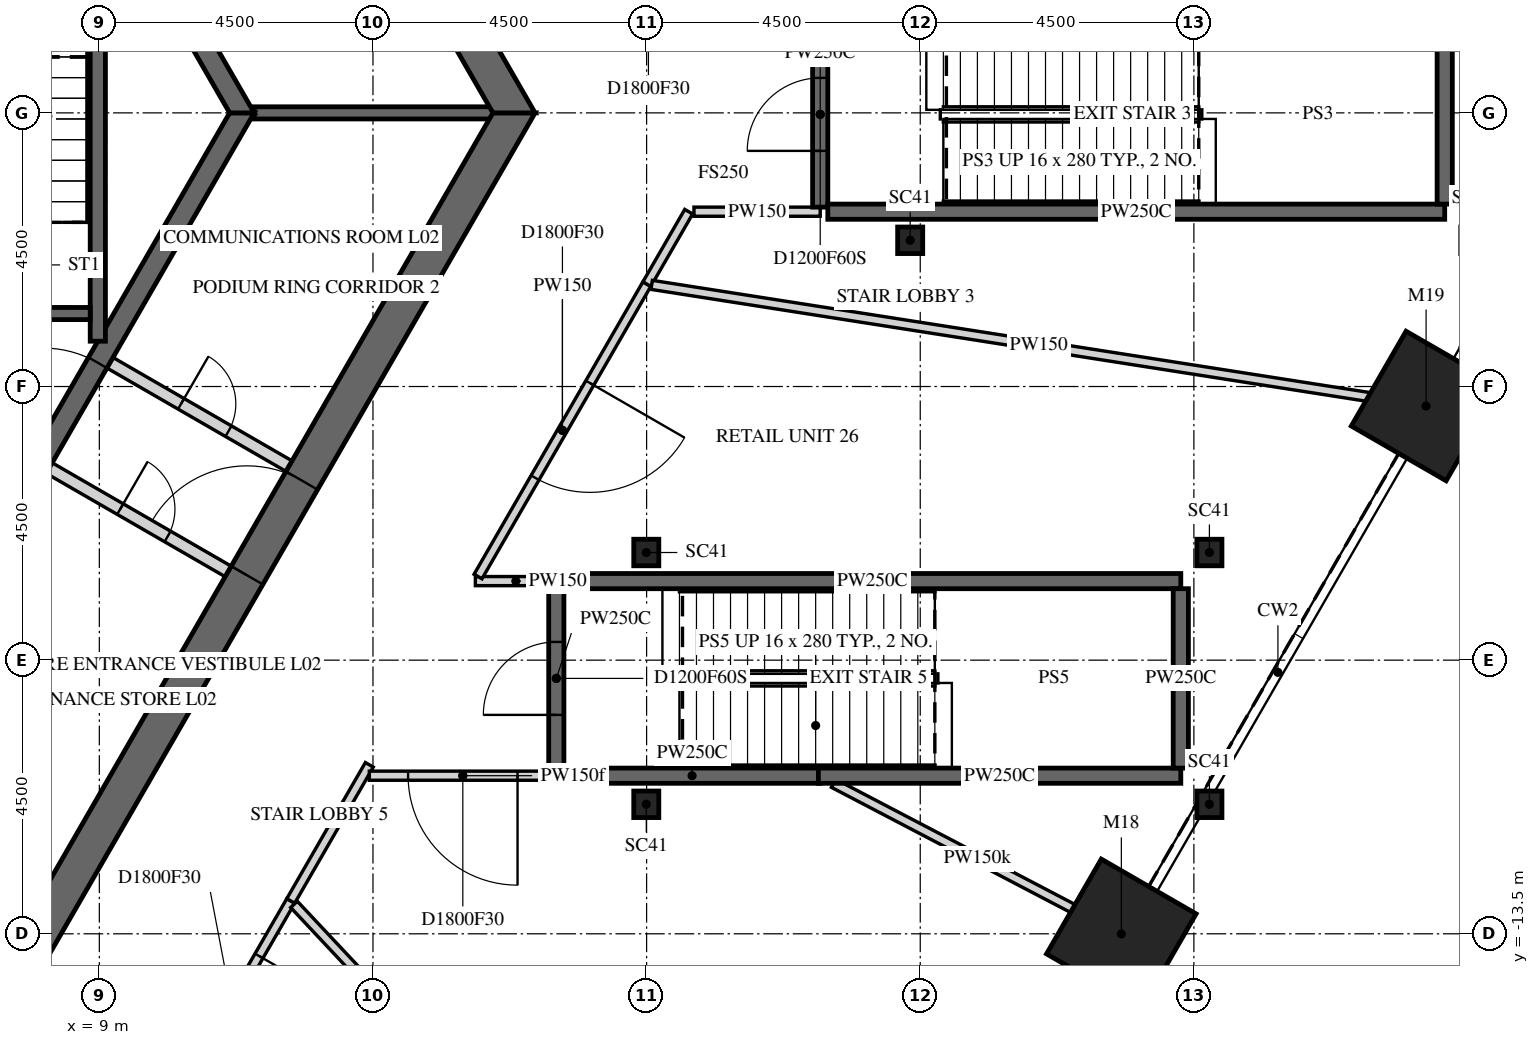
"""IFC4 building model, lengths in metres.
Left out: names, types, materials, properties, quantities, classifications, styles, units other than length and angle.
Written with IfcOpenShell. Run it as: python <this file> out.ifc"""

import sys

from ifc_helpers import new_model, si_unit, direction, frame, frame_2d, origin, origin_2d, place, context, subcontext, project, spatial, polyline, rectangle, i_section, outline, extrude, element, fill, save


model = new_model("IFC4")
c1 = context("Model", 3, precision=1e-05, world=origin(), true_north=direction((0.0, 1.0)))
c2 = subcontext(c1, "Body", "Model", "MODEL_VIEW")
j1 = project(units=[si_unit("LENGTHUNIT", "METRE"), si_unit("PLANEANGLEUNIT", "RADIAN")], contexts=[c1])
p1 = place(None, origin())
s1 = spatial("IfcSite", under=j1, at=p1, CompositionType="ELEMENT")
p2 = place(p1, origin())
s2 = spatial("IfcBuilding", under=s1, at=p2, CompositionType="ELEMENT")
p3 = place(p2, frame((0.0, 0.0, 15.0)))
s3 = spatial("IfcBuildingStorey", under=s2, at=p3, CompositionType="ELEMENT", Elevation=15.0)
for number, where, z_axis, x_axis in (
    (1, (25.807, -13.501, -0.25), (0.0, 0.0, 1.0), (-0.5, -0.866, 0.0)),
    (2, (30.819, -4.82, -0.25), (0.0, 0.0, 1.0), (-0.5, -0.866, 0.0)),
):
    element("IfcColumn", number, at=place(p3, frame(where, z_axis=z_axis, x_axis=x_axis)), inside=s3, PredefinedType="COLUMN", context=c2, shape_type="SweptSolid", body=[
        extrude(rectangle(XDim=1.8, YDim=1.8, at=origin_2d()), origin(), (0.0, 0.0, 1.0), 5.5),
    ])
for number, where, z_axis, x_axis in (
    (3, (22.335, -2.095, -0.25), (0.0, 0.0, 1.0), (1.0, 0.0, 0.0)),
    (4, (27.255, -7.23, -0.25), (0.0, 0.0, 1.0), (1.0, 0.0, 0.0)),
    (5, (27.255, -11.37, -0.25), (0.0, 0.0, 1.0), (1.0, 0.0, 0.0)),
    (6, (17.995, -11.37, -0.25), (0.0, 0.0, 1.0), (1.0, 0.0, 0.0)),
    (7, (17.995, -7.23, -0.25), (0.0, 0.0, 1.0), (1.0, 0.0, 0.0)),
):
    element("IfcColumn", number, at=place(p3, frame(where, z_axis=z_axis, x_axis=x_axis)), inside=s3, PredefinedType="COLUMN", context=c2, shape_type="SweptSolid", body=[
        extrude(i_section(OverallWidth=0.412, OverallDepth=0.437, WebThickness=0.036, FlangeThickness=0.058, FilletRadius=0.015, at=origin_2d()), origin(), (0.0, 0.0, 1.0), 5.5),
    ])
p4 = place(p3, frame((7.91, -13.7, -0.25), z_axis=(0.0, 0.0, 1.0), x_axis=(0.499999880136, 0.866025472988, 0.0)))
e8 = element("IfcWall", 8, at=p4, inside=s3, PredefinedType="SHEAR", context=c2, shape_type="SweptSolid", body=[
    extrude(outline(polyline([(-0.173, -0.3), (15.993, -0.3), (15.646, 0.3), (0.173, 0.3), (-0.173, -0.3)])), origin(), (0.0, 0.0, 1.0), 5.5),
])
p5 = place(p4, frame((7.039, 0.0, 0.25)))
e9 = element("IfcOpeningElement", 9, at=p5, cuts=e8, PredefinedType="OPENING", context=c2, shape_type="SweptSolid", body=[
    extrude(rectangle(XDim=1.8, YDim=2.4, at=frame_2d((0.9, 1.2))), frame((0.0, 0.31, 0.0), z_axis=(0.0, -1.0, 0.0), x_axis=(1.0, 0.0, 0.0)), (0.0, 0.0, 1.0), 0.62),
])
p6 = place(p3, frame((15.819, 0.0, -0.25), z_axis=(0.0, 0.0, 1.0), x_axis=(-0.499999880136, 0.866025472988, 0.0)))
e10 = element("IfcWall", 10, at=p6, inside=s3, PredefinedType="SHEAR", context=c2, shape_type="SweptSolid", body=[
    extrude(outline(polyline([(-0.173, -0.3), (15.993, -0.3), (15.646, 0.3), (0.173, 0.3), (-0.173, -0.3)])), origin(), (0.0, 0.0, 1.0), 5.5),
])
p7 = place(p6, frame((6.981, 0.0, 0.25)))
e11 = element("IfcOpeningElement", 11, at=p7, cuts=e10, PredefinedType="OPENING", context=c2, shape_type="SweptSolid", body=[
    extrude(rectangle(XDim=1.8, YDim=2.4, at=frame_2d((0.9, 1.2))), frame((0.0, 0.31, 0.0), z_axis=(0.0, -1.0, 0.0), x_axis=(1.0, 0.0, 0.0)), (0.0, 0.0, 1.0), 0.62),
])
p8 = place(p3, frame((5.673, -9.825, -0.25), z_axis=(0.0, 0.0, 1.0), x_axis=(0.499995046907, 0.866028263435, 0.0)))
e12 = element("IfcWall", 12, at=p8, inside=s3, PredefinedType="SHEAR", context=c2, shape_type="SweptSolid", body=[
    extrude(outline(polyline([(-0.101, -0.175), (11.446, -0.175), (11.244, 0.175), (0.101, 0.175), (-0.101, -0.175)])), origin(), (0.0, 0.0, 1.0), 5.5),
])
p9 = place(p8, frame((4.801, 0.0, 0.25)))
e13 = element("IfcOpeningElement", 13, at=p9, cuts=e12, PredefinedType="OPENING", context=c2, shape_type="SweptSolid", body=[
    extrude(rectangle(XDim=1.8, YDim=2.4, at=frame_2d((0.9, 1.2))), frame((0.0, 0.185, 0.0), z_axis=(0.0, -1.0, 0.0), x_axis=(1.0, 0.0, 0.0)), (0.0, 0.0, 1.0), 0.37),
])
p10 = place(p3, frame((11.345, 0.0, -0.25), z_axis=(0.0, 0.0, 1.0), x_axis=(-0.499995046907, 0.866028263435, 0.0)))
e14 = element("IfcWall", 14, at=p10, inside=s3, PredefinedType="SHEAR", context=c2, shape_type="SweptSolid", body=[
    extrude(outline(polyline([(-0.101, -0.175), (11.446, -0.175), (11.244, 0.175), (0.101, 0.175), (-0.101, -0.175)])), origin(), (0.0, 0.0, 1.0), 5.5),
])
p11 = place(p10, frame((4.744, 0.0, 0.25)))
e15 = element("IfcOpeningElement", 15, at=p11, cuts=e14, PredefinedType="OPENING", context=c2, shape_type="SweptSolid", body=[
    extrude(rectangle(XDim=1.8, YDim=2.4, at=frame_2d((0.9, 1.2))), frame((0.0, 0.185, 0.0), z_axis=(0.0, -1.0, 0.0), x_axis=(1.0, 0.0, 0.0)), (0.0, 0.0, 1.0), 0.37),
])
p12 = place(p3, frame((11.547, 0.0, -0.25), z_axis=(0.0, 0.0, 1.0), x_axis=(1.0, 0.0, 0.0)))
e16 = element("IfcWall", 16, at=p12, inside=s3, PredefinedType="SHEAR", context=c2, shape_type="SweptSolid", body=[
    extrude(rectangle(XDim=3.926, YDim=0.2, at=frame_2d((1.963, 0.0))), origin(), (0.0, 0.0, 1.0), 5.5),
])
p13 = place(p3, frame((9.175, -4.109, 0.0), z_axis=(0.0, 0.0, 1.0), x_axis=(0.865989465428, -0.500062241894, 0.0)))
e17 = element("IfcWall", 17, at=p13, inside=s3, PredefinedType="PARTITIONING", context=c2, shape_type="SweptSolid", body=[
    extrude(rectangle(XDim=3.4, YDim=0.2, at=frame_2d((1.7, 0.0))), origin(), (0.0, 0.0, 1.0), 5.25),
])
p14 = place(p13, frame((1.351, 0.0, 0.0)))
e18 = element("IfcOpeningElement", 18, at=p14, cuts=e17, PredefinedType="OPENING", context=c2, shape_type="SweptSolid", body=[
    extrude(rectangle(XDim=0.9, YDim=2.1, at=frame_2d((0.45, 1.05))), frame((0.0, 0.11, 0.0), z_axis=(0.0, -1.0, 0.0), x_axis=(1.0, 0.0, 0.0)), (0.0, 0.0, 1.0), 0.22),
])
p15 = place(p3, frame((8.175, -5.841, 0.0), z_axis=(0.0, 0.0, 1.0), x_axis=(0.866020560687, -0.500008388397, 0.0)))
e19 = element("IfcWall", 19, at=p15, inside=s3, PredefinedType="PARTITIONING", context=c2, shape_type="SweptSolid", body=[
    extrude(rectangle(XDim=3.4, YDim=0.2, at=frame_2d((1.7, 0.0))), origin(), (0.0, 0.0, 1.0), 5.25),
])
p16 = place(p15, frame((1.35, 0.0, 0.0)))
e20 = element("IfcOpeningElement", 20, at=p16, cuts=e19, PredefinedType="OPENING", context=c2, shape_type="SweptSolid", body=[
    extrude(rectangle(XDim=0.9, YDim=2.1, at=frame_2d((0.45, 1.05))), frame((0.0, 0.11, 0.0), z_axis=(0.0, -1.0, 0.0), x_axis=(1.0, 0.0, 0.0)), (0.0, 0.0, 1.0), 0.22),
])
p17 = place(p3, frame((8.975, -3.755, -0.25), z_axis=(0.0, 0.0, 1.0), x_axis=(0.0, 1.0, 0.0)))
e21 = element("IfcWall", 21, at=p17, inside=s3, PredefinedType="SHEAR", context=c2, shape_type="SweptSolid", body=[
    extrude(rectangle(XDim=7.51, YDim=0.25, at=frame_2d((3.755, 0.0))), origin(), (0.0, 0.0, 1.0), 5.5),
])
p18 = place(p3, frame((5.9, -3.3, -0.25), z_axis=(0.0, 0.0, 1.0), x_axis=(1.0, 0.0, 0.0)))
e22 = element("IfcWall", 22, at=p18, inside=s3, PredefinedType="SHEAR", context=c2, shape_type="SweptSolid", body=[
    extrude(rectangle(XDim=2.95, YDim=0.2, at=frame_2d((1.475, 0.0))), origin(), (0.0, 0.0, 1.0), 5.5),
])
p19 = place(p18, frame((0.875, 0.0, 0.25)))
e23 = element("IfcOpeningElement", 23, at=p19, cuts=e22, PredefinedType="OPENING", context=c2, shape_type="SweptSolid", body=[
    extrude(rectangle(XDim=1.2, YDim=2.4, at=frame_2d((0.6, 1.2))), frame((0.0, 0.11, 0.0), z_axis=(0.0, -1.0, 0.0), x_axis=(1.0, 0.0, 0.0)), (0.0, 0.0, 1.0), 0.22),
])
p20 = place(p3, frame((12.148, -12.959, 0.0), z_axis=(0.0, 0.0, 1.0), x_axis=(-0.500006760876, -0.866021500355, 0.0)))
e24 = element("IfcWall", 24, at=p20, inside=s3, PredefinedType="PARTITIONING", context=c2, shape_type="SweptSolid", body=[
    extrude(rectangle(XDim=3.89, YDim=0.15, at=frame_2d((1.945, 0.0))), origin(), (0.0, 0.0, 1.0), 5.25),
])
p21 = place(p20, frame((1.045, 0.0, 0.0)))
e25 = element("IfcOpeningElement", 25, at=p21, cuts=e24, PredefinedType="OPENING", context=c2, shape_type="SweptSolid", body=[
    extrude(rectangle(XDim=1.8, YDim=2.1, at=frame_2d((0.9, 1.05))), frame((0.0, 0.085, 0.0), z_axis=(0.0, -1.0, 0.0), x_axis=(1.0, 0.0, 0.0)), (0.0, 0.0, 1.0), 0.17),
])
p22 = place(p3, frame((12.148, -12.959, 0.0), z_axis=(0.0, 0.0, 1.0), x_axis=(0.499959617396, 0.866048717436, 0.0)))
e26 = element("IfcWall", 26, at=p22, inside=s3, PredefinedType="PARTITIONING", context=c2, shape_type="SweptSolid", body=[
    extrude(rectangle(XDim=2.584, YDim=0.15, at=frame_2d((1.292, 0.0))), origin(), (0.0, 0.0, 1.0), 5.25),
])
p23 = place(p3, frame((15.184, -7.7, 0.0), z_axis=(0.0, 0.0, 1.0), x_axis=(1.0, 0.0, 0.0)))
e27 = element("IfcWall", 27, at=p23, inside=s3, PredefinedType="PARTITIONING", context=c2, shape_type="SweptSolid", body=[
    extrude(rectangle(XDim=1.331, YDim=0.15, at=frame_2d((0.666, 0.0))), origin(), (0.0, 0.0, 1.0), 5.25),
])
p24 = place(p3, frame((18.004, -2.816, 0.0), z_axis=(0.0, 0.0, 1.0), x_axis=(-0.500011685716, -0.866018656928, 0.0)))
e28 = element("IfcWall", 28, at=p24, inside=s3, PredefinedType="PARTITIONING", context=c2, shape_type="SweptSolid", body=[
    extrude(rectangle(XDim=5.553, YDim=0.15, at=frame_2d((2.776, 0.0))), origin(), (0.0, 0.0, 1.0), 5.25),
])
p25 = place(p24, frame((1.876, 0.0, 0.0)))
e29 = element("IfcOpeningElement", 29, at=p25, cuts=e28, PredefinedType="OPENING", context=c2, shape_type="SweptSolid", body=[
    extrude(rectangle(XDim=1.8, YDim=2.1, at=frame_2d((0.9, 1.05))), frame((0.0, 0.085, 0.0), z_axis=(0.0, -1.0, 0.0), x_axis=(1.0, 0.0, 0.0)), (0.0, 0.0, 1.0), 0.17),
])
p26 = place(p3, frame((16.515, -10.9, 0.0), z_axis=(0.0, 0.0, 1.0), x_axis=(-1.0, 0.0, 0.0)))
e30 = element("IfcWall", 30, at=p26, inside=s3, PredefinedType="PARTITIONING", context=c2, shape_type="SweptSolid", body=[
    extrude(rectangle(XDim=3.075, YDim=0.15, at=frame_2d((1.538, 0.0))), origin(), (0.0, 0.0, 1.0), 4.496),
])
p27 = place(p26, frame((0.637, 0.0, 0.0)))
e31 = element("IfcOpeningElement", 31, at=p27, cuts=e30, PredefinedType="OPENING", context=c2, shape_type="SweptSolid", body=[
    extrude(rectangle(XDim=1.8, YDim=2.1, at=frame_2d((0.9, 1.05))), frame((0.0, 0.085, 0.0), z_axis=(0.0, -1.0, 0.0), x_axis=(1.0, 0.0, 0.0)), (0.0, 0.0, 1.0), 0.17),
])
p28 = place(p3, frame((16.515, -10.825, 0.0), z_axis=(0.0, 0.0, 1.0), x_axis=(0.0, 1.0, 0.0)))
e32 = element("IfcWall", 32, at=p28, inside=s3, PredefinedType="PARTITIONING", context=c2, shape_type="SweptSolid", body=[
    extrude(rectangle(XDim=3.05, YDim=0.25, at=frame_2d((1.525, 0.0))), origin(), (0.0, 0.0, 1.0), 5.25),
])
p29 = place(p28, frame((0.925, 0.0, 0.0)))
e33 = element("IfcOpeningElement", 33, at=p29, cuts=e32, PredefinedType="OPENING", context=c2, shape_type="SweptSolid", body=[
    extrude(rectangle(XDim=1.2, YDim=2.1, at=frame_2d((0.6, 1.05))), frame((0.0, 0.135, 0.0), z_axis=(0.0, -1.0, 0.0), x_axis=(1.0, 0.0, 0.0)), (0.0, 0.0, 1.0), 0.27),
])
p30 = place(p3, frame((16.64, -7.7, 0.0), z_axis=(0.0, 0.0, 1.0), x_axis=(1.0, 0.0, 0.0)))
e34 = element("IfcWall", 34, at=p30, inside=s3, PredefinedType="PARTITIONING", context=c2, shape_type="SweptSolid", body=[
    extrude(rectangle(XDim=10.145, YDim=0.25, at=frame_2d((5.073, 0.0))), origin(), (0.0, 0.0, 1.0), 5.25),
])
p31 = place(p3, frame((18.004, -2.816, 0.0), z_axis=(0.0, 0.0, 1.0), x_axis=(0.500224363519, 0.865895828689, 0.0)))
e35 = element("IfcWall", 35, at=p31, inside=s3, PredefinedType="PARTITIONING", context=c2, shape_type="SweptSolid", body=[
    extrude(rectangle(XDim=1.375, YDim=0.15, at=frame_2d((0.688, 0.0))), origin(), (0.0, 0.0, 1.0), 5.25),
])
p32 = place(p3, frame((20.795, -22.182, 0.0), z_axis=(0.0, 0.0, 1.0), x_axis=(-0.683955995382, 0.729523266511, 0.0)))
e36 = element("IfcWall", 36, at=p32, inside=s3, PredefinedType="PARTITIONING", context=c2, shape_type="SweptSolid", body=[
    extrude(rectangle(XDim=12.564, YDim=0.15, at=frame_2d((6.282, 0.0))), origin(), (0.0, 0.0, 1.0), 4.496),
])
p33 = place(p3, frame((20.855, -1.625, 0.0), z_axis=(0.0, 0.0, 1.0), x_axis=(-1.0, 0.0, 0.0)))
e37 = element("IfcWall", 37, at=p33, inside=s3, PredefinedType="PARTITIONING", context=c2, shape_type="SweptSolid", body=[
    extrude(rectangle(XDim=2.076, YDim=0.15, at=frame_2d((1.038, 0.0))), origin(), (0.0, 0.0, 1.0), 5.25),
])
p34 = place(p3, frame((20.855, -1.55, 0.0), z_axis=(0.0, 0.0, 1.0), x_axis=(0.0, 1.0, 0.0)))
e38 = element("IfcWall", 38, at=p34, inside=s3, PredefinedType="PARTITIONING", context=c2, shape_type="SweptSolid", body=[
    extrude(rectangle(XDim=3.05, YDim=0.25, at=frame_2d((1.525, 0.0))), origin(), (0.0, 0.0, 1.0), 5.25),
])
p35 = place(p34, frame((0.925, 0.0, 0.0)))
e39 = element("IfcOpeningElement", 39, at=p35, cuts=e38, PredefinedType="OPENING", context=c2, shape_type="SweptSolid", body=[
    extrude(rectangle(XDim=1.2, YDim=2.1, at=frame_2d((0.6, 1.05))), frame((0.0, 0.135, 0.0), z_axis=(0.0, -1.0, 0.0), x_axis=(1.0, 0.0, 0.0)), (0.0, 0.0, 1.0), 0.27),
])
p36 = place(p3, frame((20.856, -10.9, 0.0), z_axis=(0.0, 0.0, 1.0), x_axis=(-1.0, 0.0, 0.0)))
e40 = element("IfcWall", 40, at=p36, inside=s3, PredefinedType="PARTITIONING", context=c2, shape_type="SweptSolid", body=[
    extrude(rectangle(XDim=4.216, YDim=0.25, at=frame_2d((2.108, 0.0))), origin(), (0.0, 0.0, 1.0), 5.25),
])
p37 = place(p3, frame((25.807, -13.501, 0.0), z_axis=(0.0, 0.0, 1.0), x_axis=(-0.886067598261, 0.463556049807, 0.0)))
e41 = element("IfcWall", 41, at=p37, inside=s3, PredefinedType="PARTITIONING", context=c2, shape_type="SweptSolid", body=[
    extrude(rectangle(XDim=5.342, YDim=0.15, at=frame_2d((2.671, 0.0))), origin(), (0.0, 0.0, 1.0), 4.323),
])
p38 = place(p3, frame((26.785, -10.9, 0.0), z_axis=(0.0, 0.0, 1.0), x_axis=(-1.0, 0.0, 0.0)))
e42 = element("IfcWall", 42, at=p38, inside=s3, PredefinedType="PARTITIONING", context=c2, shape_type="SweptSolid", body=[
    extrude(rectangle(XDim=5.96, YDim=0.25, at=frame_2d((2.98, 0.0))), origin(), (0.0, 0.0, 1.0), 5.25),
])
p39 = place(p3, frame((26.785, -7.825, 0.0), z_axis=(0.0, 0.0, 1.0), x_axis=(0.0, -1.0, 0.0)))
e43 = element("IfcWall", 43, at=p39, inside=s3, PredefinedType="PARTITIONING", context=c2, shape_type="SweptSolid", body=[
    extrude(rectangle(XDim=2.95, YDim=0.25, at=frame_2d((1.475, 0.0))), origin(), (0.0, 0.0, 1.0), 5.25),
])
p40 = place(p3, frame((30.819, -4.82, 0.0), z_axis=(0.0, 0.0, 1.0), x_axis=(-0.98799117117, 0.154510341693, 0.0)))
e44 = element("IfcWall", 44, at=p40, inside=s3, PredefinedType="PARTITIONING", context=c2, shape_type="SweptSolid", body=[
    extrude(rectangle(XDim=12.89, YDim=0.15, at=frame_2d((6.445, 0.0))), origin(), (0.0, 0.0, 1.0), 5.25),
])
p41 = place(p3, frame((31.125, -1.625, 0.0), z_axis=(0.0, 0.0, 1.0), x_axis=(-1.0, 0.0, 0.0)))
e45 = element("IfcWall", 45, at=p41, inside=s3, PredefinedType="PARTITIONING", context=c2, shape_type="SweptSolid", body=[
    extrude(rectangle(XDim=10.145, YDim=0.25, at=frame_2d((5.073, 0.0))), origin(), (0.0, 0.0, 1.0), 5.25),
])
p42 = place(p3, frame((31.125, 1.45, 0.0), z_axis=(0.0, 0.0, 1.0), x_axis=(0.0, -1.0, 0.0)))
e46 = element("IfcWall", 46, at=p42, inside=s3, PredefinedType="PARTITIONING", context=c2, shape_type="SweptSolid", body=[
    extrude(rectangle(XDim=2.95, YDim=0.25, at=frame_2d((1.475, 0.0))), origin(), (0.0, 0.0, 1.0), 5.25),
])
p43 = place(p5, origin())
e47 = element("IfcDoor", 47, at=p43, inside=s3, OperationType="DOUBLE_DOOR_SINGLE_SWING", PredefinedType="DOOR", context=c2, shape_type="SweptSolid", body=[
    extrude(rectangle(XDim=1.8, YDim=2.4, at=frame_2d((0.9, 1.2))), frame((0.0, 0.025, 0.0), z_axis=(0.0, -1.0, 0.0), x_axis=(1.0, 0.0, 0.0)), (0.0, 0.0, 1.0), 0.05),
])
fill(e9, e47)
p44 = place(p9, origin())
e48 = element("IfcDoor", 48, at=p44, inside=s3, OperationType="DOUBLE_DOOR_SINGLE_SWING", PredefinedType="DOOR", context=c2, shape_type="SweptSolid", body=[
    extrude(rectangle(XDim=1.8, YDim=2.4, at=frame_2d((0.9, 1.2))), frame((0.0, 0.025, 0.0), z_axis=(0.0, -1.0, 0.0), x_axis=(1.0, 0.0, 0.0)), (0.0, 0.0, 1.0), 0.05),
])
fill(e13, e48)
p45 = place(p14, origin())
e49 = element("IfcDoor", 49, at=p45, inside=s3, OperationType="SINGLE_SWING_LEFT", PredefinedType="DOOR", context=c2, shape_type="SweptSolid", body=[
    extrude(rectangle(XDim=0.9, YDim=2.1, at=frame_2d((0.45, 1.05))), frame((0.0, 0.025, 0.0), z_axis=(0.0, -1.0, 0.0), x_axis=(1.0, 0.0, 0.0)), (0.0, 0.0, 1.0), 0.05),
])
fill(e18, e49)
p46 = place(p16, origin())
e50 = element("IfcDoor", 50, at=p46, inside=s3, OperationType="SINGLE_SWING_LEFT", PredefinedType="DOOR", context=c2, shape_type="SweptSolid", body=[
    extrude(rectangle(XDim=0.9, YDim=2.1, at=frame_2d((0.45, 1.05))), frame((0.0, 0.025, 0.0), z_axis=(0.0, -1.0, 0.0), x_axis=(1.0, 0.0, 0.0)), (0.0, 0.0, 1.0), 0.05),
])
fill(e20, e50)
p47 = place(p21, origin())
e51 = element("IfcDoor", 51, at=p47, inside=s3, OperationType="DOUBLE_DOOR_SINGLE_SWING", PredefinedType="DOOR", context=c2, shape_type="SweptSolid", body=[
    extrude(rectangle(XDim=1.8, YDim=2.1, at=frame_2d((0.9, 1.05))), frame((0.0, 0.025, 0.0), z_axis=(0.0, -1.0, 0.0), x_axis=(1.0, 0.0, 0.0)), (0.0, 0.0, 1.0), 0.05),
])
fill(e25, e51)
p48 = place(p25, origin())
e52 = element("IfcDoor", 52, at=p48, inside=s3, OperationType="DOUBLE_DOOR_SINGLE_SWING", PredefinedType="DOOR", context=c2, shape_type="SweptSolid", body=[
    extrude(rectangle(XDim=1.8, YDim=2.1, at=frame_2d((0.9, 1.05))), frame((0.0, 0.025, 0.0), z_axis=(0.0, -1.0, 0.0), x_axis=(1.0, 0.0, 0.0)), (0.0, 0.0, 1.0), 0.05),
])
fill(e29, e52)
p49 = place(p27, origin())
e53 = element("IfcDoor", 53, at=p49, inside=s3, OperationType="DOUBLE_DOOR_SINGLE_SWING", PredefinedType="DOOR", context=c2, shape_type="SweptSolid", body=[
    extrude(rectangle(XDim=1.8, YDim=2.1, at=frame_2d((0.9, 1.05))), frame((0.0, 0.025, 0.0), z_axis=(0.0, -1.0, 0.0), x_axis=(1.0, 0.0, 0.0)), (0.0, 0.0, 1.0), 0.05),
])
fill(e31, e53)
p50 = place(p29, origin())
e54 = element("IfcDoor", 54, at=p50, inside=s3, OperationType="SINGLE_SWING_RIGHT", PredefinedType="DOOR", context=c2, shape_type="SweptSolid", body=[
    extrude(rectangle(XDim=1.2, YDim=2.1, at=frame_2d((0.6, 1.05))), frame((0.0, 0.025, 0.0), z_axis=(0.0, -1.0, 0.0), x_axis=(1.0, 0.0, 0.0)), (0.0, 0.0, 1.0), 0.05),
])
fill(e33, e54)
p51 = place(p35, origin())
e55 = element("IfcDoor", 55, at=p51, inside=s3, OperationType="SINGLE_SWING_LEFT", PredefinedType="DOOR", context=c2, shape_type="SweptSolid", body=[
    extrude(rectangle(XDim=1.2, YDim=2.1, at=frame_2d((0.6, 1.05))), frame((0.0, 0.025, 0.0), z_axis=(0.0, -1.0, 0.0), x_axis=(1.0, 0.0, 0.0)), (0.0, 0.0, 1.0), 0.05),
])
fill(e39, e55)
save(model, sys.argv[1])
